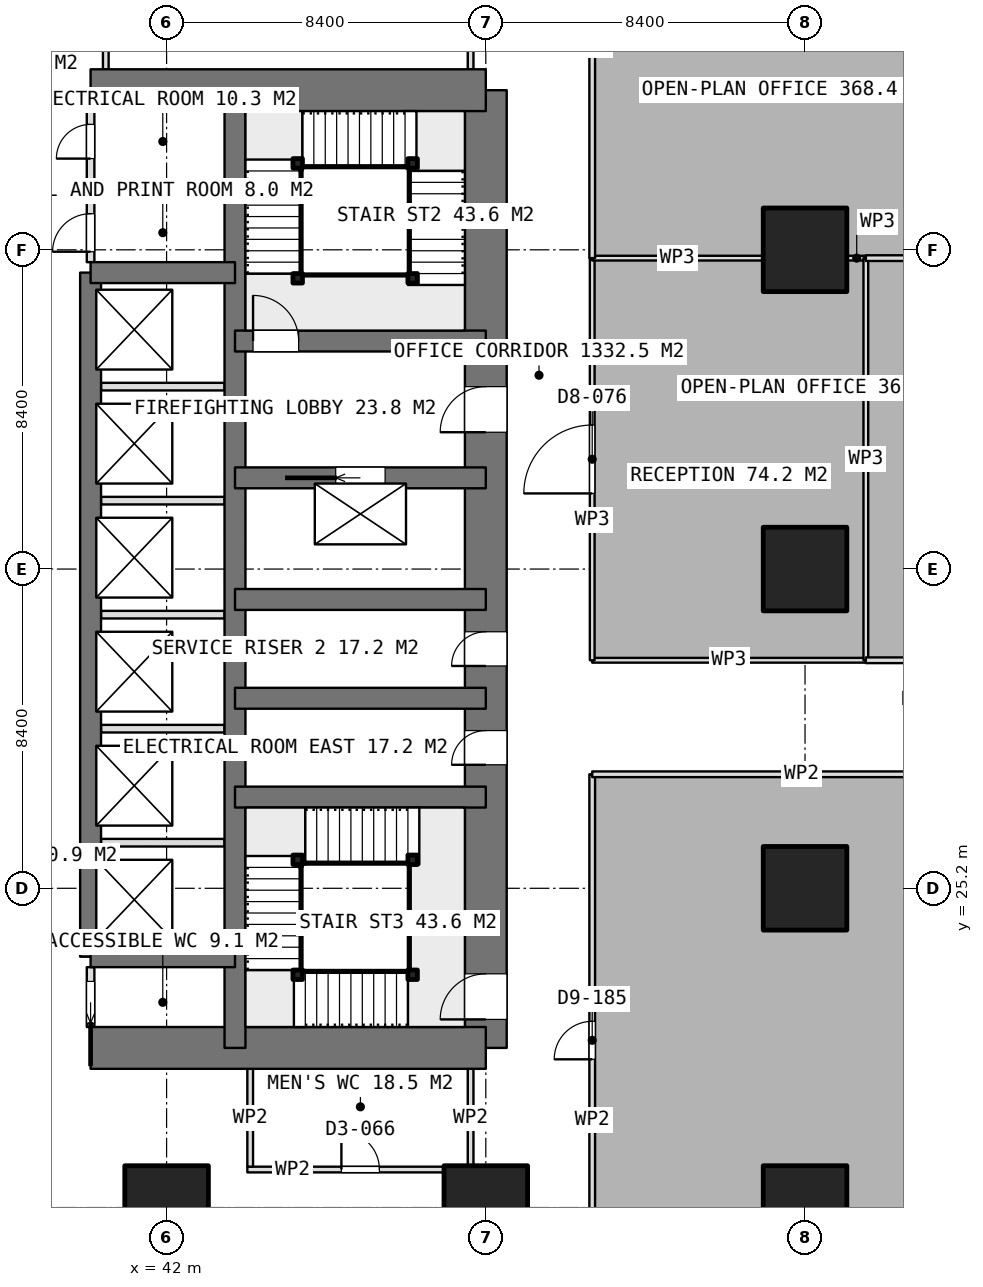
"""IFC4 building model, lengths in metres.
Left out: names, types, materials, properties, quantities, classifications, styles, units other than length and angle.
Written with IfcOpenShell. Run it as: python <this file> out.ifc"""

import sys

from ifc_helpers import new_model, si_unit, direction, frame, frame_2d, origin, origin_2d, place, context, subcontext, project, spatial, rectangle, extrude, element, fill, save


model = new_model("IFC4")
c1 = context("Model", 3, precision=1e-05, world=origin(), true_north=direction((0.0, 1.0)))
c2 = subcontext(c1, "Body", "Model", "MODEL_VIEW")
j1 = project(units=[si_unit("LENGTHUNIT", "METRE"), si_unit("PLANEANGLEUNIT", "RADIAN")], contexts=[c1])
p1 = place(None, origin())
s1 = spatial("IfcSite", under=j1, at=p1, CompositionType="ELEMENT")
p2 = place(p1, origin())
s2 = spatial("IfcBuilding", under=s1, at=p2, CompositionType="ELEMENT")
p3 = place(p2, frame((0.0, 0.0, 59.15)))
s3 = spatial("IfcBuildingStorey", under=s2, at=p3, CompositionType="ELEMENT", Elevation=59.15)
for number, where, z_axis, x_axis in (
    (1, (40.0, 21.0, 0.0), (0.0, 0.0, 1.0), (1.0, 0.0, 0.0)),
    (2, (40.0, 46.2, 0.0), (0.0, 0.0, 1.0), (1.0, 0.0, 0.0)),
):
    element("IfcWall", number, at=place(p3, frame(where, z_axis=z_axis, x_axis=x_axis)), inside=s3, PredefinedType="SHEAR", context=c2, shape_type="SweptSolid", body=[
        extrude(rectangle(XDim=10.4, YDim=1.1, at=frame_2d((5.2, 0.0))), origin(), (0.0, 0.0, 1.0), 3.75),
    ])
p4 = place(p3, frame((50.4, 21.0, 0.0), z_axis=(0.0, 0.0, 1.0), x_axis=(0.0, 1.0, 0.0)))
e3 = element("IfcWall", 3, at=p4, inside=s3, PredefinedType="SHEAR", context=c2, shape_type="SweptSolid", body=[
    extrude(rectangle(XDim=25.2, YDim=1.1, at=frame_2d((12.6, 0.0))), origin(), (0.0, 0.0, 1.0), 3.75),
])
p5 = place(p4, frame((16.2, 0.0, 0.0)))
e4 = element("IfcOpeningElement", 4, at=p5, cuts=e3, PredefinedType="OPENING", context=c2, shape_type="SweptSolid", body=[
    extrude(rectangle(XDim=1.2, YDim=2.1, at=frame_2d((0.6, 1.05))), frame((0.0, 0.56, 0.0), z_axis=(0.0, -1.0, 0.0), x_axis=(1.0, 0.0, 0.0)), (0.0, 0.0, 1.0), 1.12),
])
p6 = place(p4, frame((10.05, 0.0, 0.0)))
e5 = element("IfcOpeningElement", 5, at=p6, cuts=e3, PredefinedType="OPENING", context=c2, shape_type="SweptSolid", body=[
    extrude(rectangle(XDim=0.9, YDim=2.1, at=frame_2d((0.45, 1.05))), frame((0.0, 0.56, 0.0), z_axis=(0.0, -1.0, 0.0), x_axis=(1.0, 0.0, 0.0)), (0.0, 0.0, 1.0), 1.12),
])
p7 = place(p4, frame((7.45, 0.0, 0.0)))
e6 = element("IfcOpeningElement", 6, at=p7, cuts=e3, PredefinedType="OPENING", context=c2, shape_type="SweptSolid", body=[
    extrude(rectangle(XDim=0.9, YDim=2.1, at=frame_2d((0.45, 1.05))), frame((0.0, 0.56, 0.0), z_axis=(0.0, -1.0, 0.0), x_axis=(1.0, 0.0, 0.0)), (0.0, 0.0, 1.0), 1.12),
])
p8 = place(p4, frame((0.75, 0.0, 0.0)))
e7 = element("IfcOpeningElement", 7, at=p8, cuts=e3, PredefinedType="OPENING", context=c2, shape_type="SweptSolid", body=[
    extrude(rectangle(XDim=1.2, YDim=2.1, at=frame_2d((0.6, 1.05))), frame((0.0, 0.56, 0.0), z_axis=(0.0, -1.0, 0.0), x_axis=(1.0, 0.0, 0.0)), (0.0, 0.0, 1.0), 1.12),
])
p9 = place(p3, frame((43.8, 21.0, 0.0), z_axis=(0.0, 0.0, 1.0), x_axis=(0.0, 1.0, 0.0)))
e8 = element("IfcWall", 8, at=p9, inside=s3, PredefinedType="SHEAR", context=c2, shape_type="SweptSolid", body=[
    extrude(rectangle(XDim=25.2, YDim=0.55, at=frame_2d((12.6, 0.0))), origin(), (0.0, 0.0, 1.0), 3.75),
])
p10 = place(p3, frame((40.0, 23.4, 0.0), z_axis=(0.0, 0.0, 1.0), x_axis=(0.0, 1.0, 0.0)))
e9 = element("IfcWall", 9, at=p10, inside=s3, PredefinedType="SHEAR", context=c2, shape_type="SweptSolid", body=[
    extrude(rectangle(XDim=18.0, YDim=0.55, at=frame_2d((9.0, 0.0))), origin(), (0.0, 0.0, 1.0), 3.75),
])
for number, where, z_axis, x_axis in (
    (10, (40.0, 23.4, 0.0), (0.0, 0.0, 1.0), (1.0, 0.0, 0.0)),
    (11, (40.0, 41.4, 0.0), (0.0, 0.0, 1.0), (1.0, 0.0, 0.0)),
):
    element("IfcWall", number, at=place(p3, frame(where, z_axis=z_axis, x_axis=x_axis)), inside=s3, PredefinedType="SHEAR", context=c2, shape_type="SweptSolid", body=[
        extrude(rectangle(XDim=3.8, YDim=0.55, at=frame_2d((1.9, 0.0))), origin(), (0.0, 0.0, 1.0), 3.75),
    ])
for number, where, z_axis, x_axis in (
    (12, (43.8, 27.6, 0.0), (0.0, 0.0, 1.0), (1.0, 0.0, 0.0)),
    (13, (43.8, 30.2, 0.0), (0.0, 0.0, 1.0), (1.0, 0.0, 0.0)),
    (14, (43.8, 32.8, 0.0), (0.0, 0.0, 1.0), (1.0, 0.0, 0.0)),
):
    element("IfcWall", number, at=place(p3, frame(where, z_axis=z_axis, x_axis=x_axis)), inside=s3, PredefinedType="SHEAR", context=c2, shape_type="SweptSolid", body=[
        extrude(rectangle(XDim=6.6, YDim=0.55, at=frame_2d((3.3, 0.0))), origin(), (0.0, 0.0, 1.0), 3.75),
    ])
p11 = place(p3, frame((43.8, 36.0, 0.0), z_axis=(0.0, 0.0, 1.0), x_axis=(1.0, 0.0, 0.0)))
e15 = element("IfcWall", 15, at=p11, inside=s3, PredefinedType="SHEAR", context=c2, shape_type="SweptSolid", body=[
    extrude(rectangle(XDim=6.6, YDim=0.55, at=frame_2d((3.3, 0.0))), origin(), (0.0, 0.0, 1.0), 3.75),
])
p12 = place(p11, frame((2.65, 0.0, 0.0)))
e16 = element("IfcOpeningElement", 16, at=p12, cuts=e15, PredefinedType="OPENING", context=c2, shape_type="SweptSolid", body=[
    extrude(rectangle(XDim=1.3, YDim=2.1, at=frame_2d((0.65, 1.05))), frame((0.0, 0.285, 0.0), z_axis=(0.0, -1.0, 0.0), x_axis=(1.0, 0.0, 0.0)), (0.0, 0.0, 1.0), 0.57),
])
p13 = place(p3, frame((43.8, 39.6, 0.0), z_axis=(0.0, 0.0, 1.0), x_axis=(1.0, 0.0, 0.0)))
e17 = element("IfcWall", 17, at=p13, inside=s3, PredefinedType="SHEAR", context=c2, shape_type="SweptSolid", body=[
    extrude(rectangle(XDim=6.6, YDim=0.55, at=frame_2d((3.3, 0.0))), origin(), (0.0, 0.0, 1.0), 3.75),
])
p14 = place(p13, frame((0.475, 0.0, 0.0)))
e18 = element("IfcOpeningElement", 18, at=p14, cuts=e17, PredefinedType="OPENING", context=c2, shape_type="SweptSolid", body=[
    extrude(rectangle(XDim=1.2, YDim=2.1, at=frame_2d((0.6, 1.05))), frame((0.0, 0.285, 0.0), z_axis=(0.0, -1.0, 0.0), x_axis=(1.0, 0.0, 0.0)), (0.0, 0.0, 1.0), 0.57),
])
for number, where, z_axis, x_axis in (
    (19, (42.0, 16.8, 0.0), (0.0, 0.0, 1.0), (1.0, 0.0, 0.0)),
    (20, (50.4, 16.8, 0.0), (0.0, 0.0, 1.0), (1.0, 0.0, 0.0)),
    (21, (58.8, 16.8, 0.0), (0.0, 0.0, 1.0), (1.0, 0.0, 0.0)),
    (22, (58.8, 25.2, 0.0), (0.0, 0.0, 1.0), (1.0, 0.0, 0.0)),
    (23, (58.8, 33.6, 0.0), (0.0, 0.0, 1.0), (1.0, 0.0, 0.0)),
    (24, (58.8, 42.0, 0.0), (0.0, 0.0, 1.0), (1.0, 0.0, 0.0)),
):
    element("IfcColumn", number, at=place(p3, frame(where, z_axis=z_axis, x_axis=x_axis)), inside=s3, PredefinedType="COLUMN", context=c2, shape_type="SweptSolid", body=[
        extrude(rectangle(XDim=2.2, YDim=2.2, at=origin_2d()), origin(), (0.0, 0.0, 1.0), 3.75),
    ])
for number, where, z_axis, x_axis in (
    (25, (40.275, 26.4, 0.0), (0.0, 0.0, 1.0), (1.0, 0.0, 0.0)),
    (26, (40.275, 29.4, 0.0), (0.0, 0.0, 1.0), (1.0, 0.0, 0.0)),
    (27, (40.275, 32.4, 0.0), (0.0, 0.0, 1.0), (1.0, 0.0, 0.0)),
    (28, (40.275, 35.4, 0.0), (0.0, 0.0, 1.0), (1.0, 0.0, 0.0)),
    (29, (40.275, 38.4, 0.0), (0.0, 0.0, 1.0), (1.0, 0.0, 0.0)),
):
    element("IfcWall", number, at=place(p3, frame(where, z_axis=z_axis, x_axis=x_axis)), inside=s3, PredefinedType="PARTITIONING", context=c2, shape_type="SweptSolid", body=[
        extrude(rectangle(XDim=3.25, YDim=0.2, at=frame_2d((1.625, 0.0))), origin(), (0.0, 0.0, 1.0), 3.5),
    ])
p15 = place(p3, frame((40.0, 21.55, 0.0), z_axis=(0.0, 0.0, 1.0), x_axis=(0.0, 1.0, 0.0)))
e30 = element("IfcWall", 30, at=p15, inside=s3, PredefinedType="PARTITIONING", context=c2, shape_type="SweptSolid", body=[
    extrude(rectangle(XDim=1.575, YDim=0.2, at=frame_2d((0.788, 0.0))), origin(), (0.0, 0.0, 1.0), 3.5),
])
p16 = place(p15, frame((0.1, 0.0, 0.0)))
e31 = element("IfcOpeningElement", 31, at=p16, cuts=e30, PredefinedType="OPENING", context=c2, shape_type="SweptSolid", body=[
    extrude(rectangle(XDim=1.1, YDim=2.1, at=frame_2d((0.55, 1.05))), frame((0.0, 0.11, 0.0), z_axis=(0.0, -1.0, 0.0), x_axis=(1.0, 0.0, 0.0)), (0.0, 0.0, 1.0), 0.22),
])
p17 = place(p3, frame((40.0, 41.675, 0.0), z_axis=(0.0, 0.0, 1.0), x_axis=(0.0, 1.0, 0.0)))
e32 = element("IfcWall", 32, at=p17, inside=s3, PredefinedType="PARTITIONING", context=c2, shape_type="SweptSolid", body=[
    extrude(rectangle(XDim=3.975, YDim=0.2, at=frame_2d((1.987, 0.0))), origin(), (0.0, 0.0, 1.0), 3.5),
])
p18 = place(p17, frame((2.725, 0.0, 0.0)))
e33 = element("IfcOpeningElement", 33, at=p18, cuts=e32, PredefinedType="OPENING", context=c2, shape_type="SweptSolid", body=[
    extrude(rectangle(XDim=0.9, YDim=2.1, at=frame_2d((0.45, 1.05))), frame((0.0, 0.11, 0.0), z_axis=(0.0, -1.0, 0.0), x_axis=(1.0, 0.0, 0.0)), (0.0, 0.0, 1.0), 0.22),
])
p19 = place(p17, frame((0.275, 0.0, 0.0)))
e34 = element("IfcOpeningElement", 34, at=p19, cuts=e32, PredefinedType="OPENING", context=c2, shape_type="SweptSolid", body=[
    extrude(rectangle(XDim=1.0, YDim=2.1, at=frame_2d((0.5, 1.05))), frame((0.0, 0.11, 0.0), z_axis=(0.0, -1.0, 0.0), x_axis=(1.0, 0.0, 0.0)), (0.0, 0.0, 1.0), 0.22),
])
p20 = place(p3, frame((40.0, 43.5, 0.0), z_axis=(0.0, 0.0, 1.0), x_axis=(1.0, 0.0, 0.0)))
e35 = element("IfcWall", 35, at=p20, inside=s3, PredefinedType="PARTITIONING", context=c2, shape_type="SweptSolid", body=[
    extrude(rectangle(XDim=3.525, YDim=0.2, at=frame_2d((1.762, 0.0))), origin(), (0.0, 0.0, 1.0), 3.5),
])
for number, where, z_axis, x_axis in (
    (36, (40.4, 46.75, 0.0), (0.0, 0.0, 1.0), (0.0, 1.0, 0.0)),
    (37, (50.0, 46.75, 0.0), (0.0, 0.0, 1.0), (0.0, 1.0, 0.0)),
):
    element("IfcWall", number, at=place(p3, frame(where, z_axis=z_axis, x_axis=x_axis)), inside=s3, PredefinedType="PARTITIONING", context=c2, shape_type="SweptSolid", body=[
        extrude(rectangle(XDim=2.575, YDim=0.15, at=frame_2d((1.288, 0.0))), origin(), (0.0, 0.0, 1.0), 3.5),
    ])
p21 = place(p3, frame((44.125, 17.8, 0.0), z_axis=(0.0, 0.0, 1.0), x_axis=(1.0, 0.0, 0.0)))
e38 = element("IfcWall", 38, at=p21, inside=s3, PredefinedType="PARTITIONING", context=c2, shape_type="SweptSolid", body=[
    extrude(rectangle(XDim=5.95, YDim=0.15, at=frame_2d((2.975, 0.0))), origin(), (0.0, 0.0, 1.0), 3.5),
])
p22 = place(p21, frame((2.475, 0.0, 0.0)))
e39 = element("IfcOpeningElement", 39, at=p22, cuts=e38, PredefinedType="OPENING", context=c2, shape_type="SweptSolid", body=[
    extrude(rectangle(XDim=1.0, YDim=2.1, at=frame_2d((0.5, 1.05))), frame((0.0, 0.085, 0.0), z_axis=(0.0, -1.0, 0.0), x_axis=(1.0, 0.0, 0.0)), (0.0, 0.0, 1.0), 0.17),
])
for number, where, z_axis, x_axis in (
    (40, (44.2, 17.875, 0.0), (0.0, 0.0, 1.0), (0.0, 1.0, 0.0)),
    (41, (50.0, 17.875, 0.0), (0.0, 0.0, 1.0), (0.0, 1.0, 0.0)),
):
    element("IfcWall", number, at=place(p3, frame(where, z_axis=z_axis, x_axis=x_axis)), inside=s3, PredefinedType="PARTITIONING", context=c2, shape_type="SweptSolid", body=[
        extrude(rectangle(XDim=2.575, YDim=0.15, at=frame_2d((1.288, 0.0))), origin(), (0.0, 0.0, 1.0), 3.5),
    ])
p23 = place(p3, frame((53.2, 14.2, 0.0), z_axis=(0.0, 0.0, 1.0), x_axis=(0.0, 1.0, 0.0)))
e42 = element("IfcWall", 42, at=p23, inside=s3, PredefinedType="PARTITIONING", context=c2, shape_type="SweptSolid", body=[
    extrude(rectangle(XDim=14.0, YDim=0.15, at=frame_2d((7.0, 0.0))), origin(), (0.0, 0.0, 1.0), 3.5),
])
p24 = place(p23, frame((6.5, 0.0, 0.0)))
e43 = element("IfcOpeningElement", 43, at=p24, cuts=e42, PredefinedType="OPENING", context=c2, shape_type="SweptSolid", body=[
    extrude(rectangle(XDim=1.0, YDim=2.1, at=frame_2d((0.5, 1.05))), frame((0.0, 0.085, 0.0), z_axis=(0.0, -1.0, 0.0), x_axis=(1.0, 0.0, 0.0)), (0.0, 0.0, 1.0), 0.17),
])
p25 = place(p3, frame((53.2, 28.2, 0.0), z_axis=(0.0, 0.0, 1.0), x_axis=(1.0, 0.0, 0.0)))
e44 = element("IfcWall", 44, at=p25, inside=s3, PredefinedType="PARTITIONING", context=c2, shape_type="SweptSolid", body=[
    extrude(rectangle(XDim=11.019, YDim=0.15, at=frame_2d((5.51, 0.0))), origin(), (0.0, 0.0, 1.0), 3.5),
])
p26 = place(p3, frame((60.4, 31.2, 0.0), z_axis=(0.0, 0.0, 1.0), x_axis=(-1.0, 0.0, 0.0)))
e45 = element("IfcWall", 45, at=p26, inside=s3, PredefinedType="PARTITIONING", context=c2, shape_type="SweptSolid", body=[
    extrude(rectangle(XDim=7.2, YDim=0.125, at=frame_2d((3.6, 0.0))), origin(), (0.0, 0.0, 1.0), 3.5),
])
p27 = place(p3, frame((53.2, 31.2, 0.0), z_axis=(0.0, 0.0, 1.0), x_axis=(0.0, 1.0, 0.0)))
e46 = element("IfcWall", 46, at=p27, inside=s3, PredefinedType="PARTITIONING", context=c2, shape_type="SweptSolid", body=[
    extrude(rectangle(XDim=10.581, YDim=0.125, at=frame_2d((5.291, 0.0))), origin(), (0.0, 0.0, 1.0), 3.5),
])
p28 = place(p27, frame((4.39, 0.0, 0.0)))
e47 = element("IfcOpeningElement", 47, at=p28, cuts=e46, PredefinedType="OPENING", context=c2, shape_type="SweptSolid", body=[
    extrude(rectangle(XDim=1.8, YDim=2.1, at=frame_2d((0.9, 1.05))), frame((0.0, 0.073, 0.0), z_axis=(0.0, -1.0, 0.0), x_axis=(1.0, 0.0, 0.0)), (0.0, 0.0, 1.0), 0.145),
])
p29 = place(p3, frame((53.2, 41.781, 0.0), z_axis=(0.0, 0.0, 1.0), x_axis=(1.0, 0.0, 0.0)))
e48 = element("IfcWall", 48, at=p29, inside=s3, PredefinedType="PARTITIONING", context=c2, shape_type="SweptSolid", body=[
    extrude(rectangle(XDim=4.48, YDim=0.125, at=frame_2d((2.24, 0.0))), origin(), (0.0, 0.0, 1.0), 3.5),
])
p30 = place(p3, frame((59.92, 41.781, 0.0), z_axis=(0.0, 0.0, 1.0), x_axis=(1.0, 0.0, 0.0)))
e49 = element("IfcWall", 49, at=p30, inside=s3, PredefinedType="PARTITIONING", context=c2, shape_type="SweptSolid", body=[
    extrude(rectangle(XDim=0.48, YDim=0.125, at=frame_2d((0.24, 0.0))), origin(), (0.0, 0.0, 1.0), 3.5),
])
p31 = place(p3, frame((60.4, 41.781, 0.0), z_axis=(0.0, 0.0, 1.0), x_axis=(0.0, -1.0, 0.0)))
e50 = element("IfcWall", 50, at=p31, inside=s3, PredefinedType="PARTITIONING", context=c2, shape_type="SweptSolid", body=[
    extrude(rectangle(XDim=10.581, YDim=0.125, at=frame_2d((5.291, 0.0))), origin(), (0.0, 0.0, 1.0), 3.5),
])
p32 = place(p3, frame((64.091, 31.2, 0.0), z_axis=(0.0, 0.0, 1.0), x_axis=(-1.0, 0.0, 0.0)))
e51 = element("IfcWall", 51, at=p32, inside=s3, PredefinedType="PARTITIONING", context=c2, shape_type="SweptSolid", body=[
    extrude(rectangle(XDim=3.691, YDim=0.15, at=frame_2d((1.846, 0.0))), origin(), (0.0, 0.0, 1.0), 3.5),
])
p33 = place(p32, frame((1.346, 0.0, 0.0)))
e52 = element("IfcOpeningElement", 52, at=p33, cuts=e51, PredefinedType="OPENING", context=c2, shape_type="SweptSolid", body=[
    extrude(rectangle(XDim=1.0, YDim=2.1, at=frame_2d((0.5, 1.05))), frame((0.0, 0.085, 0.0), z_axis=(0.0, -1.0, 0.0), x_axis=(1.0, 0.0, 0.0)), (0.0, 0.0, 1.0), 0.17),
])
p34 = place(p3, frame((60.4, 41.781, 0.0), z_axis=(0.0, 0.0, 1.0), x_axis=(1.0, 0.0, 0.0)))
e53 = element("IfcWall", 53, at=p34, inside=s3, PredefinedType="PARTITIONING", context=c2, shape_type="SweptSolid", body=[
    extrude(rectangle(XDim=3.239, YDim=0.15, at=frame_2d((1.62, 0.0))), origin(), (0.0, 0.0, 1.0), 3.5),
])
p35 = place(p3, frame((53.2, 41.782, 0.0), z_axis=(0.0, 0.0, 1.0), x_axis=(0.0, 1.0, 0.0)))
e54 = element("IfcWall", 54, at=p35, inside=s3, PredefinedType="PARTITIONING", context=c2, shape_type="SweptSolid", body=[
    extrude(rectangle(XDim=11.218, YDim=0.15, at=frame_2d((5.609, 0.0))), origin(), (0.0, 0.0, 1.0), 3.5),
])
for number, where, z_axis, x_axis in (
    (55, (45.45, 41.25, 0.0), (0.0, 0.0, 1.0), (1.0, 0.0, 0.0)),
    (56, (45.45, 44.275, 0.0), (0.0, 0.0, 1.0), (1.0, 0.0, 0.0)),
    (57, (48.475, 44.275, 0.0), (0.0, 0.0, 1.0), (1.0, 0.0, 0.0)),
    (58, (48.475, 41.25, 0.0), (0.0, 0.0, 1.0), (1.0, 0.0, 0.0)),
    (59, (48.475, 22.925, 0.0), (0.0, 0.0, 1.0), (1.0, 0.0, 0.0)),
    (60, (45.45, 22.925, 0.0), (0.0, 0.0, 1.0), (1.0, 0.0, 0.0)),
    (61, (45.45, 25.95, 0.0), (0.0, 0.0, 1.0), (1.0, 0.0, 0.0)),
    (62, (48.475, 25.95, 0.0), (0.0, 0.0, 1.0), (1.0, 0.0, 0.0)),
):
    element("IfcColumn", number, at=place(p3, frame(where, z_axis=z_axis, x_axis=x_axis)), inside=s3, PredefinedType="COLUMN", context=c2, shape_type="SweptSolid", body=[
        extrude(rectangle(XDim=0.25, YDim=0.25, at=origin_2d()), origin(), (0.0, 0.0, 1.0), 3.75),
    ])
p36 = place(p5, origin())
e63 = element("IfcDoor", 63, at=p36, inside=s3, OperationType="SINGLE_SWING_LEFT", PredefinedType="DOOR", context=c2, shape_type="SweptSolid", body=[
    extrude(rectangle(XDim=1.2, YDim=2.1, at=frame_2d((0.6, 1.05))), frame((0.0, 0.025, 0.0), z_axis=(0.0, -1.0, 0.0), x_axis=(1.0, 0.0, 0.0)), (0.0, 0.0, 1.0), 0.05),
])
fill(e4, e63)
p37 = place(p6, origin())
e64 = element("IfcDoor", 64, at=p37, inside=s3, OperationType="SINGLE_SWING_LEFT", PredefinedType="DOOR", context=c2, shape_type="SweptSolid", body=[
    extrude(rectangle(XDim=0.9, YDim=2.1, at=frame_2d((0.45, 1.05))), frame((0.0, 0.025, 0.0), z_axis=(0.0, -1.0, 0.0), x_axis=(1.0, 0.0, 0.0)), (0.0, 0.0, 1.0), 0.05),
])
fill(e5, e64)
p38 = place(p7, origin())
e65 = element("IfcDoor", 65, at=p38, inside=s3, OperationType="SINGLE_SWING_LEFT", PredefinedType="DOOR", context=c2, shape_type="SweptSolid", body=[
    extrude(rectangle(XDim=0.9, YDim=2.1, at=frame_2d((0.45, 1.05))), frame((0.0, 0.025, 0.0), z_axis=(0.0, -1.0, 0.0), x_axis=(1.0, 0.0, 0.0)), (0.0, 0.0, 1.0), 0.05),
])
fill(e6, e65)
p39 = place(p16, origin())
e66 = element("IfcDoor", 66, at=p39, inside=s3, OperationType="SLIDING_TO_LEFT", PredefinedType="DOOR", context=c2, shape_type="SweptSolid", body=[
    extrude(rectangle(XDim=1.1, YDim=2.1, at=frame_2d((0.55, 1.05))), frame((0.0, 0.025, 0.0), z_axis=(0.0, -1.0, 0.0), x_axis=(1.0, 0.0, 0.0)), (0.0, 0.0, 1.0), 0.05),
])
fill(e31, e66)
p40 = place(p18, origin())
e67 = element("IfcDoor", 67, at=p40, inside=s3, OperationType="SINGLE_SWING_LEFT", PredefinedType="DOOR", context=c2, shape_type="SweptSolid", body=[
    extrude(rectangle(XDim=0.9, YDim=2.1, at=frame_2d((0.45, 1.05))), frame((0.0, 0.025, 0.0), z_axis=(0.0, -1.0, 0.0), x_axis=(1.0, 0.0, 0.0)), (0.0, 0.0, 1.0), 0.05),
])
fill(e33, e67)
p41 = place(p19, origin())
e68 = element("IfcDoor", 68, at=p41, inside=s3, OperationType="SINGLE_SWING_LEFT", PredefinedType="DOOR", context=c2, shape_type="SweptSolid", body=[
    extrude(rectangle(XDim=1.0, YDim=2.1, at=frame_2d((0.5, 1.05))), frame((0.0, 0.025, 0.0), z_axis=(0.0, -1.0, 0.0), x_axis=(1.0, 0.0, 0.0)), (0.0, 0.0, 1.0), 0.05),
])
fill(e34, e68)
p42 = place(p12, origin())
e69 = element("IfcDoor", 69, at=p42, inside=s3, OperationType="SLIDING_TO_LEFT", PredefinedType="USERDEFINED", context=c2, shape_type="SweptSolid", body=[
    extrude(rectangle(XDim=1.3, YDim=2.1, at=frame_2d((0.65, 1.05))), frame((0.0, 0.025, 0.0), z_axis=(0.0, -1.0, 0.0), x_axis=(1.0, 0.0, 0.0)), (0.0, 0.0, 1.0), 0.05),
])
fill(e16, e69)
p43 = place(p22, origin())
e70 = element("IfcDoor", 70, at=p43, inside=s3, OperationType="SINGLE_SWING_LEFT", PredefinedType="DOOR", context=c2, shape_type="SweptSolid", body=[
    extrude(rectangle(XDim=1.0, YDim=2.1, at=frame_2d((0.5, 1.05))), frame((0.0, 0.025, 0.0), z_axis=(0.0, -1.0, 0.0), x_axis=(1.0, 0.0, 0.0)), (0.0, 0.0, 1.0), 0.05),
])
fill(e39, e70)
p44 = place(p24, origin())
e71 = element("IfcDoor", 71, at=p44, inside=s3, OperationType="SINGLE_SWING_LEFT", PredefinedType="DOOR", context=c2, shape_type="SweptSolid", body=[
    extrude(rectangle(XDim=1.0, YDim=2.1, at=frame_2d((0.5, 1.05))), frame((0.0, 0.025, 0.0), z_axis=(0.0, -1.0, 0.0), x_axis=(1.0, 0.0, 0.0)), (0.0, 0.0, 1.0), 0.05),
])
fill(e43, e71)
p45 = place(p28, origin())
e72 = element("IfcDoor", 72, at=p45, inside=s3, OperationType="DOUBLE_DOOR_SINGLE_SWING", PredefinedType="DOOR", context=c2, shape_type="SweptSolid", body=[
    extrude(rectangle(XDim=1.8, YDim=2.1, at=frame_2d((0.9, 1.05))), frame((0.0, 0.025, 0.0), z_axis=(0.0, -1.0, 0.0), x_axis=(1.0, 0.0, 0.0)), (0.0, 0.0, 1.0), 0.05),
])
fill(e47, e72)
p46 = place(p14, origin())
e73 = element("IfcDoor", 73, at=p46, inside=s3, OperationType="SINGLE_SWING_RIGHT", PredefinedType="DOOR", context=c2, shape_type="SweptSolid", body=[
    extrude(rectangle(XDim=1.2, YDim=2.1, at=frame_2d((0.6, 1.05))), frame((0.0, 0.025, 0.0), z_axis=(0.0, -1.0, 0.0), x_axis=(1.0, 0.0, 0.0)), (0.0, 0.0, 1.0), 0.05),
])
fill(e18, e73)
p47 = place(p8, origin())
e74 = element("IfcDoor", 74, at=p47, inside=s3, OperationType="SINGLE_SWING_RIGHT", PredefinedType="DOOR", context=c2, shape_type="SweptSolid", body=[
    extrude(rectangle(XDim=1.2, YDim=2.1, at=frame_2d((0.6, 1.05))), frame((0.0, 0.025, 0.0), z_axis=(0.0, -1.0, 0.0), x_axis=(1.0, 0.0, 0.0)), (0.0, 0.0, 1.0), 0.05),
])
fill(e7, e74)
save(model, sys.argv[1])
